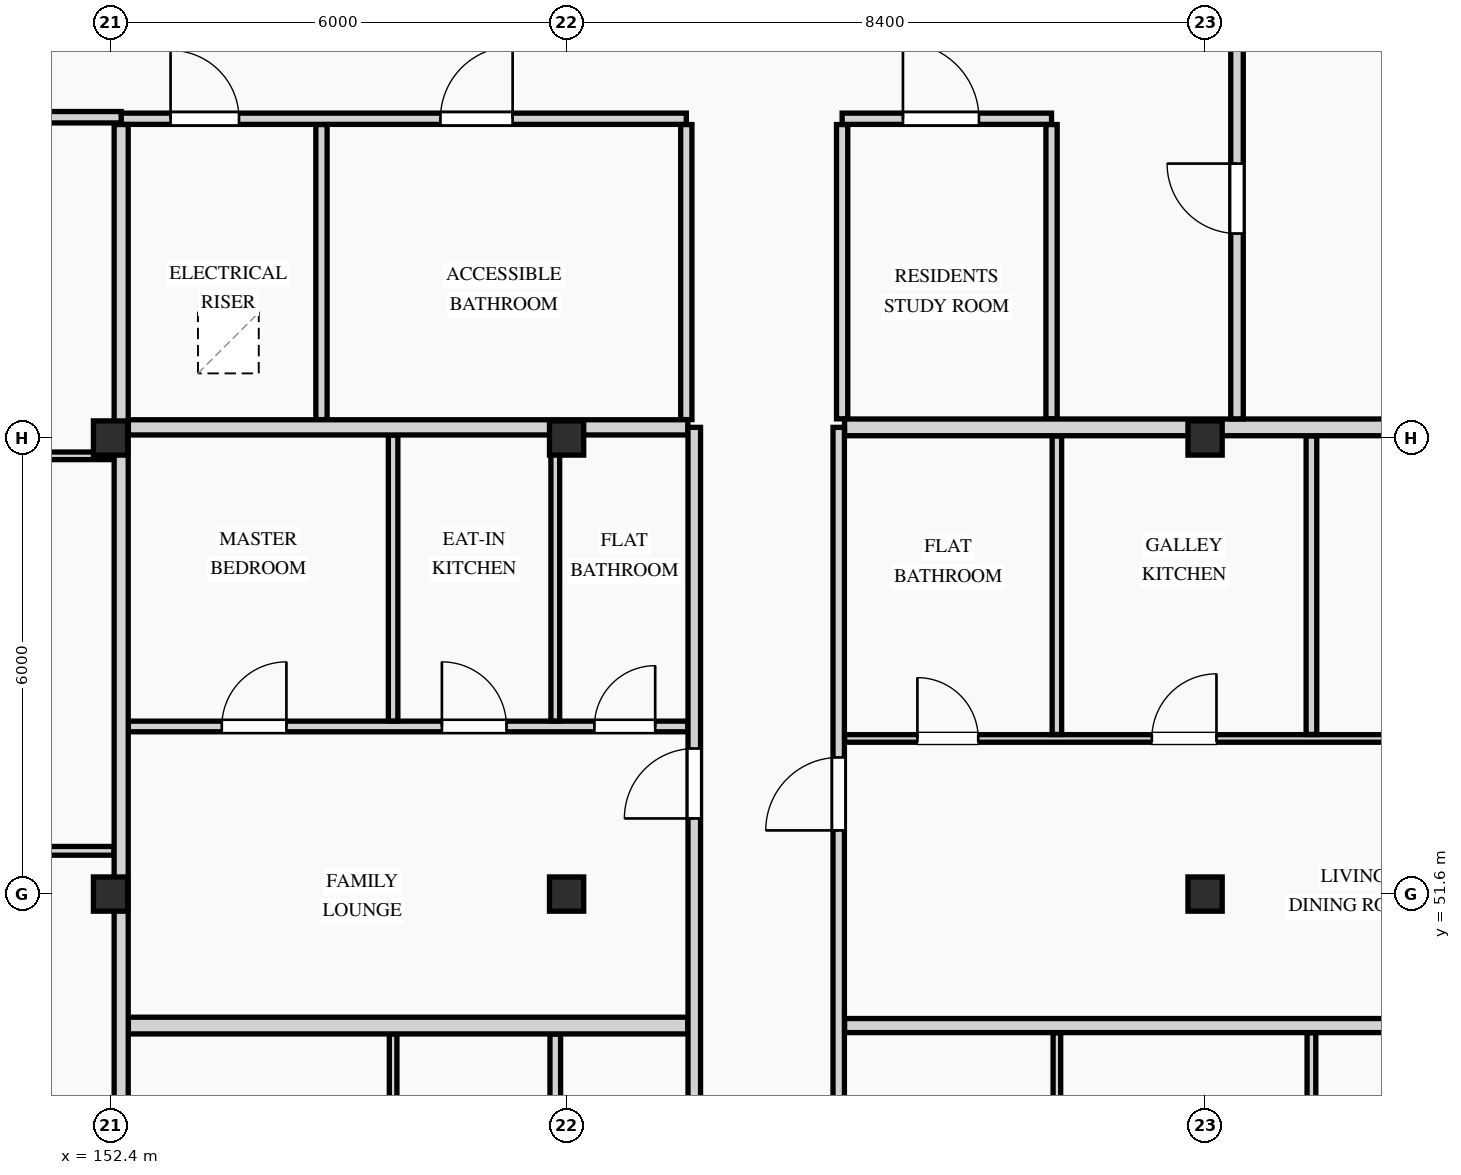
"""IFC4 building model, lengths in metres.
Left out: names, types, materials, properties, quantities, classifications, styles, units other than length and angle.
Written with IfcOpenShell. Run it as: python <this file> out.ifc"""

import sys

from ifc_helpers import new_model, si_unit, direction, frame, frame_2d, origin, origin_2d, place, context, subcontext, project, spatial, rectangle, extrude, element, fill, save


model = new_model("IFC4")
c1 = context("Model", 3, precision=1e-05, world=origin(), true_north=direction((0.0, 1.0)))
c2 = subcontext(c1, "Body", "Model", "MODEL_VIEW")
j1 = project(units=[si_unit("LENGTHUNIT", "METRE"), si_unit("PLANEANGLEUNIT", "RADIAN")], contexts=[c1])
p1 = place(None, origin())
s1 = spatial("IfcSite", under=j1, at=p1, CompositionType="ELEMENT")
p2 = place(p1, origin())
s2 = spatial("IfcBuilding", under=s1, at=p2, CompositionType="ELEMENT")
p3 = place(p2, frame((0.0, 0.0, 18.0)))
s3 = spatial("IfcBuildingStorey", under=s2, at=p3, CompositionType="ELEMENT", Elevation=18.0)
for number, where, z_axis, x_axis in (
    (1, (152.4, 51.6, 0.0), (0.0, 0.0, 1.0), (1.0, 0.0, 0.0)),
    (2, (152.4, 57.6, 0.0), (0.0, 0.0, 1.0), (1.0, 0.0, 0.0)),
    (3, (158.4, 51.6, 0.0), (0.0, 0.0, 1.0), (1.0, 0.0, 0.0)),
    (4, (158.4, 57.6, 0.0), (0.0, 0.0, 1.0), (1.0, 0.0, 0.0)),
    (5, (166.8, 51.6, 0.0), (0.0, 0.0, 1.0), (1.0, 0.0, 0.0)),
    (6, (166.8, 57.6, 0.0), (0.0, 0.0, 1.0), (1.0, 0.0, 0.0)),
):
    element("IfcColumn", number, at=place(p3, frame(where, z_axis=z_axis, x_axis=x_axis)), inside=s3, PredefinedType="COLUMN", context=c2, shape_type="SweptSolid", body=[
        extrude(rectangle(XDim=0.45, YDim=0.45, at=origin_2d()), origin(), (0.0, 0.0, 1.0), 3.3),
    ])
for number, where, z_axis, x_axis in (
    (7, (155.175, 61.724, 0.0), (0.0, 0.0, 1.0), (0.0, -1.0, 0.0)),
    (8, (159.975, 61.724, 0.0), (0.0, 0.0, 1.0), (0.0, -1.0, 0.0)),
):
    element("IfcWall", number, at=place(p3, frame(where, z_axis=z_axis, x_axis=x_axis)), inside=s3, PredefinedType="PARTITIONING", context=c2, shape_type="SweptSolid", body=[
        extrude(rectangle(XDim=3.882, YDim=0.148, at=frame_2d((1.941, 0.0))), origin(), (0.0, 0.0, 1.0), 3.0),
    ])
for number, where, z_axis, x_axis in (
    (9, (162.025, 61.724, 0.0), (0.0, 0.0, 1.0), (0.0, -1.0, 0.0)),
    (10, (164.78, 61.724, 0.0), (0.0, 0.0, 1.0), (0.0, -1.0, 0.0)),
):
    element("IfcWall", number, at=place(p3, frame(where, z_axis=z_axis, x_axis=x_axis)), inside=s3, PredefinedType="PARTITIONING", context=c2, shape_type="SweptSolid", body=[
        extrude(rectangle(XDim=3.872, YDim=0.148, at=frame_2d((1.936, 0.0))), origin(), (0.0, 0.0, 1.0), 3.0),
    ])
p4 = place(p3, frame((152.54, 61.8, 0.0), z_axis=(0.0, 0.0, 1.0), x_axis=(1.0, 0.0, 0.0)))
e11 = element("IfcWall", 11, at=p4, inside=s3, PredefinedType="PARTITIONING", context=c2, shape_type="SweptSolid", body=[
    extrude(rectangle(XDim=7.435, YDim=0.148, at=frame_2d((3.718, 0.0))), origin(), (0.0, 0.0, 1.0), 3.0),
])
p5 = place(p4, frame((0.65, 0.0, 0.0)))
e12 = element("IfcOpeningElement", 12, at=p5, cuts=e11, PredefinedType="OPENING", context=c2, shape_type="SweptSolid", body=[
    extrude(rectangle(XDim=0.9, YDim=2.1, at=frame_2d((0.45, 1.05))), frame((0.0, 0.084, 0.0), z_axis=(0.0, -1.0, 0.0), x_axis=(1.0, 0.0, 0.0)), (0.0, 0.0, 1.0), 0.168),
])
p6 = place(p4, frame((4.2, 0.0, 0.0)))
e13 = element("IfcOpeningElement", 13, at=p6, cuts=e11, PredefinedType="OPENING", context=c2, shape_type="SweptSolid", body=[
    extrude(rectangle(XDim=0.95, YDim=2.1, at=frame_2d((0.475, 1.05))), frame((0.0, 0.084, 0.0), z_axis=(0.0, -1.0, 0.0), x_axis=(1.0, 0.0, 0.0)), (0.0, 0.0, 1.0), 0.168),
])
p7 = place(p3, frame((162.025, 61.8, 0.0), z_axis=(0.0, 0.0, 1.0), x_axis=(1.0, 0.0, 0.0)))
e14 = element("IfcWall", 14, at=p7, inside=s3, PredefinedType="PARTITIONING", context=c2, shape_type="SweptSolid", body=[
    extrude(rectangle(XDim=2.755, YDim=0.148, at=frame_2d((1.377, 0.0))), origin(), (0.0, 0.0, 1.0), 3.0),
])
p8 = place(p7, frame((0.8, 0.0, 0.0)))
e15 = element("IfcOpeningElement", 15, at=p8, cuts=e14, PredefinedType="OPENING", context=c2, shape_type="SweptSolid", body=[
    extrude(rectangle(XDim=1.0, YDim=2.15, at=frame_2d((0.5, 1.075))), frame((0.0, 0.084, 0.0), z_axis=(0.0, -1.0, 0.0), x_axis=(1.0, 0.0, 0.0)), (0.0, 0.0, 1.0), 0.168),
])
p9 = place(p3, frame((156.118, 45.024, 0.0), z_axis=(0.0, 0.0, 1.0), x_axis=(0.0, 1.0, 0.0)))
e16 = element("IfcWall", 16, at=p9, inside=s3, PredefinedType="PARTITIONING", context=c2, shape_type="SweptSolid", body=[
    extrude(rectangle(XDim=4.734, YDim=0.1, at=frame_2d((2.367, 0.0))), origin(), (0.0, 0.0, 1.0), 3.0),
])
p10 = place(p3, frame((158.251, 45.024, 0.0), z_axis=(0.0, 0.0, 1.0), x_axis=(0.0, 1.0, 0.0)))
e17 = element("IfcWall", 17, at=p10, inside=s3, PredefinedType="PARTITIONING", context=c2, shape_type="SweptSolid", body=[
    extrude(rectangle(XDim=4.734, YDim=0.14, at=frame_2d((2.367, 0.0))), origin(), (0.0, 0.0, 1.0), 2.425),
])
p11 = place(p3, frame((168.199, 45.077, 0.0), z_axis=(0.0, 0.0, 1.0), x_axis=(0.0, 1.0, 0.0)))
e18 = element("IfcWall", 18, at=p11, inside=s3, PredefinedType="PARTITIONING", context=c2, shape_type="SweptSolid", body=[
    extrude(rectangle(XDim=4.698, YDim=0.115, at=frame_2d((2.349, 0.0))), origin(), (0.0, 0.0, 1.0), 3.0),
])
p12 = place(p3, frame((164.85, 45.077, 0.0), z_axis=(0.0, 0.0, 1.0), x_axis=(0.0, 1.0, 0.0)))
e19 = element("IfcWall", 19, at=p12, inside=s3, PredefinedType="PARTITIONING", context=c2, shape_type="SweptSolid", body=[
    extrude(rectangle(XDim=4.698, YDim=0.1, at=frame_2d((2.349, 0.0))), origin(), (0.0, 0.0, 1.0), 3.0),
])
p13 = place(p3, frame((152.635, 53.805, 0.0), z_axis=(0.0, 0.0, 1.0), x_axis=(1.0, 0.0, 0.0)))
e20 = element("IfcWall", 20, at=p13, inside=s3, PredefinedType="PARTITIONING", context=c2, shape_type="SweptSolid", body=[
    extrude(rectangle(XDim=7.361, YDim=0.14, at=frame_2d((3.681, 0.0))), origin(), (0.0, 0.0, 1.0), 3.0),
])
p14 = place(p13, frame((1.229, 0.0, 0.0)))
e21 = element("IfcOpeningElement", 21, at=p14, cuts=e20, PredefinedType="OPENING", context=c2, shape_type="SweptSolid", body=[
    extrude(rectangle(XDim=0.85, YDim=2.1, at=frame_2d((0.425, 1.05))), frame((0.0, 0.08, 0.0), z_axis=(0.0, -1.0, 0.0), x_axis=(1.0, 0.0, 0.0)), (0.0, 0.0, 1.0), 0.16),
])
p15 = place(p13, frame((4.125, 0.0, 0.0)))
e22 = element("IfcOpeningElement", 22, at=p15, cuts=e20, PredefinedType="OPENING", context=c2, shape_type="SweptSolid", body=[
    extrude(rectangle(XDim=0.85, YDim=2.1, at=frame_2d((0.425, 1.05))), frame((0.0, 0.08, 0.0), z_axis=(0.0, -1.0, 0.0), x_axis=(1.0, 0.0, 0.0)), (0.0, 0.0, 1.0), 0.16),
])
p16 = place(p13, frame((6.131, 0.0, 0.0)))
e23 = element("IfcOpeningElement", 23, at=p16, cuts=e20, PredefinedType="OPENING", context=c2, shape_type="SweptSolid", body=[
    extrude(rectangle(XDim=0.8, YDim=2.1, at=frame_2d((0.4, 1.05))), frame((0.0, 0.08, 0.0), z_axis=(0.0, -1.0, 0.0), x_axis=(1.0, 0.0, 0.0)), (0.0, 0.0, 1.0), 0.16),
])
p17 = place(p3, frame((156.118, 53.877, 0.0), z_axis=(0.0, 0.0, 1.0), x_axis=(0.0, 1.0, 0.0)))
e24 = element("IfcWall", 24, at=p17, inside=s3, PredefinedType="PARTITIONING", context=c2, shape_type="SweptSolid", body=[
    extrude(rectangle(XDim=3.761, YDim=0.125, at=frame_2d((1.88, 0.0))), origin(), (0.0, 0.0, 1.0), 3.0),
])
p18 = place(p3, frame((158.251, 53.877, 0.0), z_axis=(0.0, 0.0, 1.0), x_axis=(0.0, 1.0, 0.0)))
e25 = element("IfcWall", 25, at=p18, inside=s3, PredefinedType="PARTITIONING", context=c2, shape_type="SweptSolid", body=[
    extrude(rectangle(XDim=3.761, YDim=0.115, at=frame_2d((1.88, 0.0))), origin(), (0.0, 0.0, 1.0), 2.575),
])
p19 = place(p3, frame((162.057, 53.648, 0.0), z_axis=(0.0, 0.0, 1.0), x_axis=(1.0, 0.0, 0.0)))
e26 = element("IfcWall", 26, at=p19, inside=s3, PredefinedType="PARTITIONING", context=c2, shape_type="SweptSolid", body=[
    extrude(rectangle(XDim=11.796, YDim=0.1, at=frame_2d((5.898, 0.0))), origin(), (0.0, 0.0, 1.0), 3.0),
])
p20 = place(p19, frame((0.958, 0.0, 0.0)))
e27 = element("IfcOpeningElement", 27, at=p20, cuts=e26, PredefinedType="OPENING", context=c2, shape_type="SweptSolid", body=[
    extrude(rectangle(XDim=0.8, YDim=2.1, at=frame_2d((0.4, 1.05))), frame((0.0, 0.06, 0.0), z_axis=(0.0, -1.0, 0.0), x_axis=(1.0, 0.0, 0.0)), (0.0, 0.0, 1.0), 0.12),
])
p21 = place(p19, frame((4.043, 0.0, 0.0)))
e28 = element("IfcOpeningElement", 28, at=p21, cuts=e26, PredefinedType="OPENING", context=c2, shape_type="SweptSolid", body=[
    extrude(rectangle(XDim=0.85, YDim=2.1, at=frame_2d((0.425, 1.05))), frame((0.0, 0.06, 0.0), z_axis=(0.0, -1.0, 0.0), x_axis=(1.0, 0.0, 0.0)), (0.0, 0.0, 1.0), 0.12),
])
p22 = place(p19, frame((8.588, 0.0, 0.0)))
e29 = element("IfcOpeningElement", 29, at=p22, cuts=e26, PredefinedType="OPENING", context=c2, shape_type="SweptSolid", body=[
    extrude(rectangle(XDim=0.85, YDim=2.1, at=frame_2d((0.425, 1.05))), frame((0.0, 0.06, 0.0), z_axis=(0.0, -1.0, 0.0), x_axis=(1.0, 0.0, 0.0)), (0.0, 0.0, 1.0), 0.12),
])
p23 = place(p3, frame((168.199, 53.7, 0.0), z_axis=(0.0, 0.0, 1.0), x_axis=(0.0, 1.0, 0.0)))
e30 = element("IfcWall", 30, at=p23, inside=s3, PredefinedType="PARTITIONING", context=c2, shape_type="SweptSolid", body=[
    extrude(rectangle(XDim=3.928, YDim=0.14, at=frame_2d((1.964, 0.0))), origin(), (0.0, 0.0, 1.0), 3.0),
])
p24 = place(p3, frame((164.85, 53.7, 0.0), z_axis=(0.0, 0.0, 1.0), x_axis=(0.0, 1.0, 0.0)))
e31 = element("IfcWall", 31, at=p24, inside=s3, PredefinedType="PARTITIONING", context=c2, shape_type="SweptSolid", body=[
    extrude(rectangle(XDim=3.928, YDim=0.125, at=frame_2d((1.964, 0.0))), origin(), (0.0, 0.0, 1.0), 3.0),
])
p25 = place(p3, frame((152.635, 49.87, 0.0), z_axis=(0.0, 0.0, 1.0), x_axis=(1.0, 0.0, 0.0)))
e32 = element("IfcWall", 32, at=p25, inside=s3, PredefinedType="PARTITIONING", context=c2, shape_type="SweptSolid", body=[
    extrude(rectangle(XDim=7.361, YDim=0.22, at=frame_2d((3.681, 0.0))), origin(), (0.0, 0.0, 1.0), 3.0),
])
p26 = place(p3, frame((162.057, 49.87, 0.0), z_axis=(0.0, 0.0, 1.0), x_axis=(1.0, 0.0, 0.0)))
e33 = element("IfcWall", 33, at=p26, inside=s3, PredefinedType="PARTITIONING", context=c2, shape_type="SweptSolid", body=[
    extrude(rectangle(XDim=11.796, YDim=0.185, at=frame_2d((5.898, 0.0))), origin(), (0.0, 0.0, 1.0), 3.0),
])
p27 = place(p3, frame((152.635, 57.74, 0.0), z_axis=(0.0, 0.0, 1.0), x_axis=(1.0, 0.0, 0.0)))
e34 = element("IfcWall", 34, at=p27, inside=s3, PredefinedType="PARTITIONING", context=c2, shape_type="SweptSolid", body=[
    extrude(rectangle(XDim=7.361, YDim=0.2, at=frame_2d((3.681, 0.0))), origin(), (0.0, 0.0, 1.0), 2.375),
])
p28 = place(p3, frame((162.057, 57.74, 0.0), z_axis=(0.0, 0.0, 1.0), x_axis=(1.0, 0.0, 0.0)))
e35 = element("IfcWall", 35, at=p28, inside=s3, PredefinedType="PARTITIONING", context=c2, shape_type="SweptSolid", body=[
    extrude(rectangle(XDim=11.796, YDim=0.22, at=frame_2d((5.898, 0.0))), origin(), (0.0, 0.0, 1.0), 2.375),
])
p29 = place(p3, frame((160.08, 37.347, 0.0), z_axis=(0.0, 0.0, 1.0), x_axis=(0.0, 1.0, 0.0)))
e36 = element("IfcWall", 36, at=p29, inside=s3, PredefinedType="PARTITIONING", context=c2, shape_type="SweptSolid", body=[
    extrude(rectangle(XDim=20.393, YDim=0.165, at=frame_2d((10.197, 0.0))), origin(), (0.0, 0.0, 1.0), 3.0),
])
p30 = place(p29, frame((2.31, 0.0, 0.0)))
e37 = element("IfcOpeningElement", 37, at=p30, cuts=e36, PredefinedType="OPENING", context=c2, shape_type="SweptSolid", body=[
    extrude(rectangle(XDim=0.92, YDim=2.1, at=frame_2d((0.46, 1.05))), frame((0.0, 0.093, 0.0), z_axis=(0.0, -1.0, 0.0), x_axis=(1.0, 0.0, 0.0)), (0.0, 0.0, 1.0), 0.185),
])
p31 = place(p29, frame((15.248, 0.0, 0.0)))
e38 = element("IfcOpeningElement", 38, at=p31, cuts=e36, PredefinedType="OPENING", context=c2, shape_type="SweptSolid", body=[
    extrude(rectangle(XDim=0.92, YDim=2.1, at=frame_2d((0.46, 1.05))), frame((0.0, 0.093, 0.0), z_axis=(0.0, -1.0, 0.0), x_axis=(1.0, 0.0, 0.0)), (0.0, 0.0, 1.0), 0.185),
])
p32 = place(p3, frame((161.98, 37.347, 0.0), z_axis=(0.0, 0.0, 1.0), x_axis=(0.0, 1.0, 0.0)))
e39 = element("IfcWall", 39, at=p32, inside=s3, PredefinedType="PARTITIONING", context=c2, shape_type="SweptSolid", body=[
    extrude(rectangle(XDim=20.393, YDim=0.15, at=frame_2d((10.197, 0.0))), origin(), (0.0, 0.0, 1.0), 3.0),
])
p33 = place(p32, frame((2.326, 0.0, 0.0)))
e40 = element("IfcOpeningElement", 40, at=p33, cuts=e39, PredefinedType="OPENING", context=c2, shape_type="SweptSolid", body=[
    extrude(rectangle(XDim=0.92, YDim=2.1, at=frame_2d((0.46, 1.05))), frame((0.0, 0.085, 0.0), z_axis=(0.0, -1.0, 0.0), x_axis=(1.0, 0.0, 0.0)), (0.0, 0.0, 1.0), 0.17),
])
p34 = place(p32, frame((15.091, 0.0, 0.0)))
e41 = element("IfcOpeningElement", 41, at=p34, cuts=e39, PredefinedType="OPENING", context=c2, shape_type="SweptSolid", body=[
    extrude(rectangle(XDim=0.96, YDim=2.12, at=frame_2d((0.48, 1.06))), frame((0.0, 0.085, 0.0), z_axis=(0.0, -1.0, 0.0), x_axis=(1.0, 0.0, 0.0)), (0.0, 0.0, 1.0), 0.17),
])
p35 = place(p3, frame((167.22, 57.852, 0.0), z_axis=(0.0, 0.0, 1.0), x_axis=(0.0, 1.0, 0.0)))
e42 = element("IfcWall", 42, at=p35, inside=s3, PredefinedType="PARTITIONING", context=c2, shape_type="SweptSolid", body=[
    extrude(rectangle(XDim=14.008, YDim=0.165, at=frame_2d((7.004, 0.0))), origin(), (0.0, 0.0, 1.0), 2.425),
])
p36 = place(p35, frame((2.438, 0.0, 0.0)))
e43 = element("IfcOpeningElement", 43, at=p36, cuts=e42, PredefinedType="OPENING", context=c2, shape_type="SweptSolid", body=[
    extrude(rectangle(XDim=0.92, YDim=2.1, at=frame_2d((0.46, 1.05))), frame((0.0, 0.093, 0.0), z_axis=(0.0, -1.0, 0.0), x_axis=(1.0, 0.0, 0.0)), (0.0, 0.0, 1.0), 0.185),
])
p37 = place(p3, frame((145.865, 52.169, 0.0), z_axis=(0.0, 0.0, 1.0), x_axis=(1.0, 0.0, 0.0)))
e44 = element("IfcWall", 44, at=p37, inside=s3, PredefinedType="PARTITIONING", context=c2, shape_type="SweptSolid", body=[
    extrude(rectangle(XDim=6.581, YDim=0.115, at=frame_2d((3.291, 0.0))), origin(), (0.0, 0.0, 1.0), 3.0),
])
p38 = place(p3, frame((145.865, 57.365, 0.0), z_axis=(0.0, 0.0, 1.0), x_axis=(1.0, 0.0, 0.0)))
e45 = element("IfcWall", 45, at=p38, inside=s3, PredefinedType="PARTITIONING", context=c2, shape_type="SweptSolid", body=[
    extrude(rectangle(XDim=6.581, YDim=0.1, at=frame_2d((3.291, 0.0))), origin(), (0.0, 0.0, 1.0), 2.375),
])
p39 = place(p3, frame((152.54, 43.26, 0.0), z_axis=(0.0, 0.0, 1.0), x_axis=(0.0, 1.0, 0.0)))
e46 = element("IfcWall", 46, at=p39, inside=s3, PredefinedType="PARTITIONING", context=c2, shape_type="SweptSolid", body=[
    extrude(rectangle(XDim=18.464, YDim=0.185, at=frame_2d((9.232, 0.0))), origin(), (0.0, 0.0, 1.0), 2.425),
])
p40 = place(p3, frame((138.06, 61.82, 0.0), z_axis=(0.0, 0.0, 1.0), x_axis=(1.0, 0.0, 0.0)))
e47 = element("IfcWall", 47, at=p40, inside=s3, PredefinedType="PARTITIONING", context=c2, shape_type="SweptSolid", body=[
    extrude(rectangle(XDim=14.48, YDim=0.15, at=frame_2d((7.24, 0.0))), origin(), (0.0, 0.0, 1.0), 3.0),
])
p41 = place(p40, frame((2.409, 0.0, 0.0)))
e48 = element("IfcOpeningElement", 48, at=p41, cuts=e47, PredefinedType="OPENING", context=c2, shape_type="SweptSolid", body=[
    extrude(rectangle(XDim=0.92, YDim=2.1, at=frame_2d((0.46, 1.05))), frame((0.0, 0.085, 0.0), z_axis=(0.0, -1.0, 0.0), x_axis=(1.0, 0.0, 0.0)), (0.0, 0.0, 1.0), 0.17),
])
p42 = place(p5, origin())
e49 = element("IfcDoor", 49, at=p42, inside=s3, OperationType="SINGLE_SWING_LEFT", PredefinedType="DOOR", context=c2, shape_type="SweptSolid", body=[
    extrude(rectangle(XDim=0.9, YDim=2.1, at=frame_2d((0.45, 1.05))), frame((0.0, 0.025, 0.0), z_axis=(0.0, -1.0, 0.0), x_axis=(1.0, 0.0, 0.0)), (0.0, 0.0, 1.0), 0.05),
])
fill(e12, e49)
p43 = place(p6, origin())
e50 = element("IfcDoor", 50, at=p43, inside=s3, OperationType="SINGLE_SWING_RIGHT", PredefinedType="DOOR", context=c2, shape_type="SweptSolid", body=[
    extrude(rectangle(XDim=0.95, YDim=2.1, at=frame_2d((0.475, 1.05))), frame((0.0, 0.025, 0.0), z_axis=(0.0, -1.0, 0.0), x_axis=(1.0, 0.0, 0.0)), (0.0, 0.0, 1.0), 0.05),
])
fill(e13, e50)
p44 = place(p8, origin())
e51 = element("IfcDoor", 51, at=p44, inside=s3, OperationType="SINGLE_SWING_LEFT", PredefinedType="DOOR", context=c2, shape_type="SweptSolid", body=[
    extrude(rectangle(XDim=1.0, YDim=2.15, at=frame_2d((0.5, 1.075))), frame((0.0, 0.025, 0.0), z_axis=(0.0, -1.0, 0.0), x_axis=(1.0, 0.0, 0.0)), (0.0, 0.0, 1.0), 0.05),
])
fill(e15, e51)
p45 = place(p14, origin())
e52 = element("IfcDoor", 52, at=p45, inside=s3, OperationType="SINGLE_SWING_RIGHT", PredefinedType="DOOR", context=c2, shape_type="SweptSolid", body=[
    extrude(rectangle(XDim=0.85, YDim=2.1, at=frame_2d((0.425, 1.05))), frame((0.0, 0.025, 0.0), z_axis=(0.0, -1.0, 0.0), x_axis=(1.0, 0.0, 0.0)), (0.0, 0.0, 1.0), 0.05),
])
fill(e21, e52)
p46 = place(p15, origin())
e53 = element("IfcDoor", 53, at=p46, inside=s3, OperationType="SINGLE_SWING_LEFT", PredefinedType="DOOR", context=c2, shape_type="SweptSolid", body=[
    extrude(rectangle(XDim=0.85, YDim=2.1, at=frame_2d((0.425, 1.05))), frame((0.0, 0.025, 0.0), z_axis=(0.0, -1.0, 0.0), x_axis=(1.0, 0.0, 0.0)), (0.0, 0.0, 1.0), 0.05),
])
fill(e22, e53)
p47 = place(p16, origin())
e54 = element("IfcDoor", 54, at=p47, inside=s3, OperationType="SINGLE_SWING_RIGHT", PredefinedType="DOOR", context=c2, shape_type="SweptSolid", body=[
    extrude(rectangle(XDim=0.8, YDim=2.1, at=frame_2d((0.4, 1.05))), frame((0.0, 0.025, 0.0), z_axis=(0.0, -1.0, 0.0), x_axis=(1.0, 0.0, 0.0)), (0.0, 0.0, 1.0), 0.05),
])
fill(e23, e54)
p48 = place(p20, origin())
e55 = element("IfcDoor", 55, at=p48, inside=s3, OperationType="SINGLE_SWING_LEFT", PredefinedType="DOOR", context=c2, shape_type="SweptSolid", body=[
    extrude(rectangle(XDim=0.8, YDim=2.1, at=frame_2d((0.4, 1.05))), frame((0.0, 0.025, 0.0), z_axis=(0.0, -1.0, 0.0), x_axis=(1.0, 0.0, 0.0)), (0.0, 0.0, 1.0), 0.05),
])
fill(e27, e55)
p49 = place(p21, origin())
e56 = element("IfcDoor", 56, at=p49, inside=s3, OperationType="SINGLE_SWING_RIGHT", PredefinedType="DOOR", context=c2, shape_type="SweptSolid", body=[
    extrude(rectangle(XDim=0.85, YDim=2.1, at=frame_2d((0.425, 1.05))), frame((0.0, 0.025, 0.0), z_axis=(0.0, -1.0, 0.0), x_axis=(1.0, 0.0, 0.0)), (0.0, 0.0, 1.0), 0.05),
])
fill(e28, e56)
p50 = place(p31, origin())
e57 = element("IfcDoor", 57, at=p50, inside=s3, OperationType="SINGLE_SWING_LEFT", PredefinedType="DOOR", context=c2, shape_type="SweptSolid", body=[
    extrude(rectangle(XDim=0.92, YDim=2.1, at=frame_2d((0.46, 1.05))), frame((0.0, 0.025, 0.0), z_axis=(0.0, -1.0, 0.0), x_axis=(1.0, 0.0, 0.0)), (0.0, 0.0, 1.0), 0.05),
])
fill(e38, e57)
p51 = place(p34, origin())
e58 = element("IfcDoor", 58, at=p51, inside=s3, OperationType="SINGLE_SWING_LEFT", PredefinedType="DOOR", context=c2, shape_type="SweptSolid", body=[
    extrude(rectangle(XDim=0.96, YDim=2.12, at=frame_2d((0.48, 1.06))), frame((0.0, 0.025, 0.0), z_axis=(0.0, -1.0, 0.0), x_axis=(1.0, 0.0, 0.0)), (0.0, 0.0, 1.0), 0.05),
])
fill(e41, e58)
p52 = place(p36, origin())
e59 = element("IfcDoor", 59, at=p52, inside=s3, OperationType="SINGLE_SWING_RIGHT", PredefinedType="DOOR", context=c2, shape_type="SweptSolid", body=[
    extrude(rectangle(XDim=0.92, YDim=2.1, at=frame_2d((0.46, 1.05))), frame((0.0, 0.025, 0.0), z_axis=(0.0, -1.0, 0.0), x_axis=(1.0, 0.0, 0.0)), (0.0, 0.0, 1.0), 0.05),
])
fill(e43, e59)
save(model, sys.argv[1])
